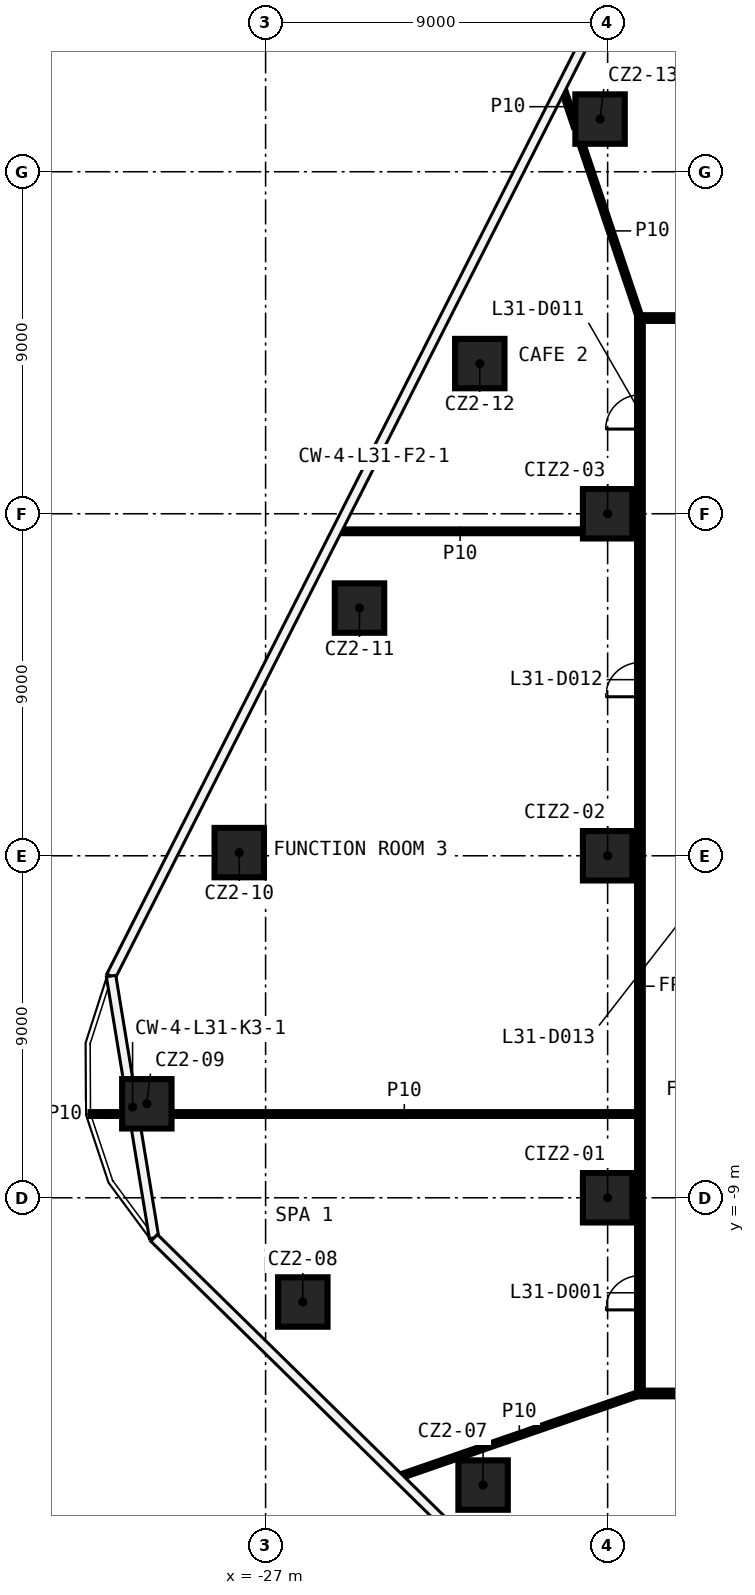
"""IFC4 building model, lengths in metres.
Left out: names, types, materials, properties, quantities, classifications, styles, units other than length and angle.
Written with IfcOpenShell. Run it as: python <this file> out.ifc"""

import sys

from ifc_helpers import new_model, si_unit, direction, frame, frame_2d, origin, origin_2d, place, context, subcontext, project, spatial, rectangle, extrude, element, fill, save


model = new_model("IFC4")
c1 = context("Model", 3, precision=1e-05, world=origin(), true_north=direction((0.0, 1.0)))
c2 = subcontext(c1, "Body", "Model", "MODEL_VIEW")
j1 = project(units=[si_unit("LENGTHUNIT", "METRE"), si_unit("PLANEANGLEUNIT", "RADIAN")], contexts=[c1])
p1 = place(None, origin())
s1 = spatial("IfcSite", under=j1, at=p1, CompositionType="ELEMENT")
p2 = place(p1, origin())
s2 = spatial("IfcBuilding", under=s1, at=p2, CompositionType="ELEMENT")
p3 = place(p2, frame((0.0, 0.0, 139.6)))
s3 = spatial("IfcBuildingStorey", under=s2, at=p3, CompositionType="ELEMENT", Elevation=139.6)
for number, where, z_axis, x_axis in (
    (1, (-21.277, -16.56, 0.0), (0.0, 0.0, 1.0), (1.0, 0.0, 0.0)),
    (2, (-26.021, -11.743, 0.0), (0.0, 0.0, 1.0), (1.0, 0.0, 0.0)),
    (3, (-30.125, -6.527, 0.0), (0.0, 0.0, 1.0), (1.0, 0.0, 0.0)),
    (4, (-27.693, 0.083, 0.0), (0.0, 0.0, 1.0), (1.0, 0.0, 0.0)),
    (5, (-24.529, 6.518, 0.0), (0.0, 0.0, 1.0), (1.0, 0.0, 0.0)),
    (6, (-21.364, 12.952, 0.0), (0.0, 0.0, 1.0), (1.0, 0.0, 0.0)),
    (7, (-18.199, 19.386, 0.0), (0.0, 0.0, 1.0), (1.0, 0.0, 0.0)),
    (8, (-18.0, -9.0, 0.0), (0.0, 0.0, 1.0), (1.0, 0.0, 0.0)),
    (9, (-18.0, 0.0, 0.0), (0.0, 0.0, 1.0), (1.0, 0.0, 0.0)),
    (10, (-18.0, 9.0, 0.0), (0.0, 0.0, 1.0), (1.0, 0.0, 0.0)),
):
    element("IfcColumn", number, at=place(p3, frame(where, z_axis=z_axis, x_axis=x_axis)), inside=s3, PredefinedType="COLUMN", context=c2, shape_type="SweptSolid", body=[
        extrude(rectangle(XDim=1.3, YDim=1.3, at=origin_2d()), origin(), (0.0, 0.0, 1.0), 5.4),
    ])
p4 = place(p3, frame((17.225, -14.15, 0.0), z_axis=(0.0, 0.0, 1.0), x_axis=(-1.0, 0.0, 0.0)))
e11 = element("IfcWall", 11, at=p4, inside=s3, PredefinedType="PARTITIONING", context=c2, shape_type="SweptSolid", body=[
    extrude(rectangle(XDim=34.45, YDim=0.15, at=frame_2d((17.225, 0.0))), origin(), (0.0, 0.0, 1.0), 5.4),
])
p5 = place(p4, frame((31.348, 0.0, 0.0)))
e12 = element("IfcOpeningElement", 12, at=p5, cuts=e11, PredefinedType="OPENING", context=c2, shape_type="SweptSolid", body=[
    extrude(rectangle(XDim=0.9, YDim=2.1, at=frame_2d((0.45, 1.05))), frame((0.0, 0.085, 0.0), z_axis=(0.0, -1.0, 0.0), x_axis=(1.0, 0.0, 0.0)), (0.0, 0.0, 1.0), 0.17),
])
p6 = place(p4, frame((17.783, 0.0, 0.0)))
e13 = element("IfcOpeningElement", 13, at=p6, cuts=e11, PredefinedType="OPENING", context=c2, shape_type="SweptSolid", body=[
    extrude(rectangle(XDim=0.9, YDim=2.1, at=frame_2d((0.45, 1.05))), frame((0.0, 0.085, 0.0), z_axis=(0.0, -1.0, 0.0), x_axis=(1.0, 0.0, 0.0)), (0.0, 0.0, 1.0), 0.17),
])
p7 = place(p4, frame((4.598, 0.0, 0.0)))
e14 = element("IfcOpeningElement", 14, at=p7, cuts=e11, PredefinedType="OPENING", context=c2, shape_type="SweptSolid", body=[
    extrude(rectangle(XDim=0.9, YDim=2.1, at=frame_2d((0.45, 1.05))), frame((0.0, 0.085, 0.0), z_axis=(0.0, -1.0, 0.0), x_axis=(1.0, 0.0, 0.0)), (0.0, 0.0, 1.0), 0.17),
])
p8 = place(p3, frame((-31.606, -6.796, 0.0), z_axis=(0.0, 0.0, 1.0), x_axis=(1.0, 0.0, 0.0)))
e15 = element("IfcWall", 15, at=p8, inside=s3, PredefinedType="PARTITIONING", context=c2, shape_type="SweptSolid", body=[
    extrude(rectangle(XDim=0.831, YDim=0.1, at=frame_2d((0.416, 0.0))), origin(), (0.0, 0.0, 1.0), 5.4),
])
p9 = place(p3, frame((-29.475, -6.796, 0.0), z_axis=(0.0, 0.0, 1.0), x_axis=(1.0, 0.0, 0.0)))
e16 = element("IfcWall", 16, at=p9, inside=s3, PredefinedType="PARTITIONING", context=c2, shape_type="SweptSolid", body=[
    extrude(rectangle(XDim=12.25, YDim=0.1, at=frame_2d((6.125, 0.0))), origin(), (0.0, 0.0, 1.0), 5.4),
])
p10 = place(p3, frame((-25.113, 8.538, 0.0), z_axis=(0.0, 0.0, 1.0), x_axis=(1.0, 0.0, 0.0)))
e17 = element("IfcWall", 17, at=p10, inside=s3, PredefinedType="PARTITIONING", context=c2, shape_type="SweptSolid", body=[
    extrude(rectangle(XDim=6.463, YDim=0.1, at=frame_2d((3.231, 0.0))), origin(), (0.0, 0.0, 1.0), 5.4),
])
p11 = place(p3, frame((-17.225, 14.15, 0.0), z_axis=(0.0, 0.0, 1.0), x_axis=(1.0, 0.0, 0.0)))
e18 = element("IfcWall", 18, at=p11, inside=s3, PredefinedType="PARTITIONING", context=c2, shape_type="SweptSolid", body=[
    extrude(rectangle(XDim=34.45, YDim=0.15, at=frame_2d((17.225, 0.0))), origin(), (0.0, 0.0, 1.0), 5.4),
])
p12 = place(p11, frame((31.208, 0.0, 0.0)))
e19 = element("IfcOpeningElement", 19, at=p12, cuts=e18, PredefinedType="OPENING", context=c2, shape_type="SweptSolid", body=[
    extrude(rectangle(XDim=0.9, YDim=2.1, at=frame_2d((0.45, 1.05))), frame((0.0, 0.085, 0.0), z_axis=(0.0, -1.0, 0.0), x_axis=(1.0, 0.0, 0.0)), (0.0, 0.0, 1.0), 0.17),
])
p13 = place(p11, frame((25.381, 0.0, 0.0)))
e20 = element("IfcOpeningElement", 20, at=p13, cuts=e18, PredefinedType="OPENING", context=c2, shape_type="SweptSolid", body=[
    extrude(rectangle(XDim=0.9, YDim=2.1, at=frame_2d((0.45, 1.05))), frame((0.0, 0.085, 0.0), z_axis=(0.0, -1.0, 0.0), x_axis=(1.0, 0.0, 0.0)), (0.0, 0.0, 1.0), 0.17),
])
p14 = place(p11, frame((17.823, 0.0, 0.0)))
e21 = element("IfcOpeningElement", 21, at=p14, cuts=e18, PredefinedType="OPENING", context=c2, shape_type="SweptSolid", body=[
    extrude(rectangle(XDim=0.9, YDim=2.1, at=frame_2d((0.45, 1.05))), frame((0.0, 0.085, 0.0), z_axis=(0.0, -1.0, 0.0), x_axis=(1.0, 0.0, 0.0)), (0.0, 0.0, 1.0), 0.17),
])
p15 = place(p3, frame((-23.498, -16.346, 0.0), z_axis=(0.0, 0.0, 1.0), x_axis=(0.945057352494, 0.326904573991, 0.0)))
e22 = element("IfcWall", 22, at=p15, inside=s3, PredefinedType="PARTITIONING", context=c2, shape_type="SweptSolid", body=[
    extrude(rectangle(XDim=6.717, YDim=0.1, at=frame_2d((3.358, 0.0))), origin(), (0.0, 0.0, 1.0), 5.4),
])
p16 = place(p3, frame((-17.15, -14.075, 0.0), z_axis=(0.0, 0.0, 1.0), x_axis=(0.0, 1.0, 0.0)))
e23 = element("IfcWall", 23, at=p16, inside=s3, PredefinedType="PARTITIONING", context=c2, shape_type="SweptSolid", body=[
    extrude(rectangle(XDim=28.15, YDim=0.15, at=frame_2d((14.075, 0.0))), origin(), (0.0, 0.0, 1.0), 5.4),
])
p17 = place(p16, frame((2.125, 0.0, 0.0)))
e24 = element("IfcOpeningElement", 24, at=p17, cuts=e23, PredefinedType="OPENING", context=c2, shape_type="SweptSolid", body=[
    extrude(rectangle(XDim=0.9, YDim=2.1, at=frame_2d((0.45, 1.05))), frame((0.0, 0.085, 0.0), z_axis=(0.0, -1.0, 0.0), x_axis=(1.0, 0.0, 0.0)), (0.0, 0.0, 1.0), 0.17),
])
p18 = place(p16, frame((25.303, 0.0, 0.0)))
e25 = element("IfcOpeningElement", 25, at=p18, cuts=e23, PredefinedType="OPENING", context=c2, shape_type="SweptSolid", body=[
    extrude(rectangle(XDim=0.9, YDim=2.1, at=frame_2d((0.45, 1.05))), frame((0.0, 0.085, 0.0), z_axis=(0.0, -1.0, 0.0), x_axis=(1.0, 0.0, 0.0)), (0.0, 0.0, 1.0), 0.17),
])
p19 = place(p16, frame((18.259, 0.0, 0.0)))
e26 = element("IfcOpeningElement", 26, at=p19, cuts=e23, PredefinedType="OPENING", context=c2, shape_type="SweptSolid", body=[
    extrude(rectangle(XDim=0.9, YDim=2.1, at=frame_2d((0.45, 1.05))), frame((0.0, 0.085, 0.0), z_axis=(0.0, -1.0, 0.0), x_axis=(1.0, 0.0, 0.0)), (0.0, 0.0, 1.0), 0.17),
])
p20 = place(p3, frame((-19.192, 20.222, 0.0), z_axis=(0.0, 0.0, 1.0), x_axis=(0.318678080151, -0.947863007629, 0.0)))
e27 = element("IfcWall", 27, at=p20, inside=s3, PredefinedType="PARTITIONING", context=c2, shape_type="SweptSolid", body=[
    extrude(rectangle(XDim=1.076, YDim=0.1, at=frame_2d((0.538, 0.0))), origin(), (0.0, 0.0, 1.0), 5.4),
])
p21 = place(p3, frame((-18.692, 18.736, 0.0), z_axis=(0.0, 0.0, 1.0), x_axis=(0.318754680196, -0.94783725072, 0.0)))
e28 = element("IfcWall", 28, at=p21, inside=s3, PredefinedType="PARTITIONING", context=c2, shape_type="SweptSolid", body=[
    extrude(rectangle(XDim=4.838, YDim=0.1, at=frame_2d((2.419, 0.0))), origin(), (0.0, 0.0, 1.0), 5.4),
])
p22 = place(p17, origin())
e29 = element("IfcDoor", 29, at=p22, inside=s3, OperationType="SINGLE_SWING_RIGHT", PredefinedType="DOOR", context=c2, shape_type="SweptSolid", body=[
    extrude(rectangle(XDim=0.9, YDim=2.1, at=frame_2d((0.45, 1.05))), frame((0.0, 0.025, 0.0), z_axis=(0.0, -1.0, 0.0), x_axis=(1.0, 0.0, 0.0)), (0.0, 0.0, 1.0), 0.05),
])
fill(e24, e29)
p23 = place(p18, origin())
e30 = element("IfcDoor", 30, at=p23, inside=s3, OperationType="SINGLE_SWING_RIGHT", PredefinedType="DOOR", context=c2, shape_type="SweptSolid", body=[
    extrude(rectangle(XDim=0.9, YDim=2.1, at=frame_2d((0.45, 1.05))), frame((0.0, 0.025, 0.0), z_axis=(0.0, -1.0, 0.0), x_axis=(1.0, 0.0, 0.0)), (0.0, 0.0, 1.0), 0.05),
])
fill(e25, e30)
p24 = place(p19, origin())
e31 = element("IfcDoor", 31, at=p24, inside=s3, OperationType="SINGLE_SWING_LEFT", PredefinedType="DOOR", context=c2, shape_type="SweptSolid", body=[
    extrude(rectangle(XDim=0.9, YDim=2.1, at=frame_2d((0.45, 1.05))), frame((0.0, 0.025, 0.0), z_axis=(0.0, -1.0, 0.0), x_axis=(1.0, 0.0, 0.0)), (0.0, 0.0, 1.0), 0.05),
])
fill(e26, e31)
save(model, sys.argv[1])
